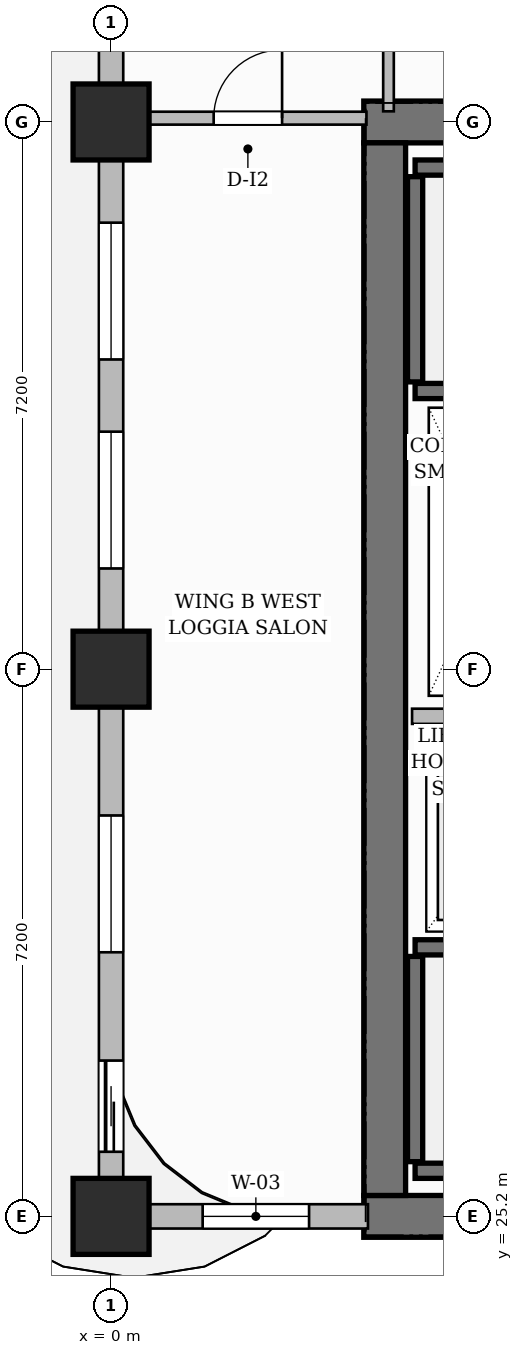
"""IFC4 building model, lengths in metres.
Left out: names, types, materials, properties, quantities, classifications, styles, units other than length and angle.
Written with IfcOpenShell. Run it as: python <this file> out.ifc"""

import sys

from ifc_helpers import new_model, si_unit, direction, frame, frame_2d, origin, origin_2d, place, context, subcontext, project, spatial, rectangle, extrude, source, transform, mapped, element, fill, save


model = new_model("IFC4")
c1 = context("Model", 3, precision=1e-05, world=origin(), true_north=direction((0.0, 1.0)))
c2 = subcontext(c1, "Body", "Model", "MODEL_VIEW")
j1 = project(units=[si_unit("LENGTHUNIT", "METRE"), si_unit("PLANEANGLEUNIT", "RADIAN")], contexts=[c1])
p1 = place(None, origin())
s1 = spatial("IfcSite", under=j1, at=p1, CompositionType="ELEMENT")
p2 = place(p1, origin())
s2 = spatial("IfcBuilding", under=s1, at=p2, CompositionType="ELEMENT")
p3 = place(p2, frame((0.0, 0.0, 122.9)))
s3 = spatial("IfcBuildingStorey", under=s2, at=p3, CompositionType="ELEMENT", Elevation=122.9)
for number, where, z_axis, x_axis in (
    (1, (3.325, 25.2, 0.0), (0.0, 0.0, 1.0), (1.0, 0.0, 0.0)),
    (2, (3.325, 39.6, 0.0), (0.0, 0.0, 1.0), (1.0, 0.0, 0.0)),
):
    element("IfcWall", number, at=place(p3, frame(where, z_axis=z_axis, x_axis=x_axis)), inside=s3, PredefinedType="SHEAR", context=c2, shape_type="SweptSolid", body=[
        extrude(rectangle(XDim=8.35, YDim=0.55, at=frame_2d((4.175, 0.0))), origin(), (0.0, 0.0, 1.0), 3.7),
    ])
p4 = place(p3, frame((3.6, 25.475, 0.0), z_axis=(0.0, 0.0, 1.0), x_axis=(0.0, 1.0, 0.0)))
e3 = element("IfcWall", 3, at=p4, inside=s3, PredefinedType="SHEAR", context=c2, shape_type="SweptSolid", body=[
    extrude(rectangle(XDim=13.85, YDim=0.55, at=frame_2d((6.925, 0.0))), origin(), (0.0, 0.0, 1.0), 3.7),
])
m1 = source(origin(), c2, "Body", "SweptSolid", [
    extrude(rectangle(XDim=1.0, YDim=1.0, at=origin_2d()), origin(), (0.0, 0.0, 1.0), 3.7),
])
for number, where, z_axis, x_axis in (
    (4, (0.0, 25.2, 0.0), (0.0, 0.0, 1.0), (1.0, 0.0, 0.0)),
    (5, (0.0, 32.4, 0.0), (0.0, 0.0, 1.0), (1.0, 0.0, 0.0)),
    (6, (0.0, 39.6, 0.0), (0.0, 0.0, 1.0), (1.0, 0.0, 0.0)),
):
    element("IfcColumn", number, at=place(p3, frame(where, z_axis=z_axis, x_axis=x_axis)), inside=s3, PredefinedType="COLUMN", context=c2, shape_type="MappedRepresentation", body=[
        mapped(m1, transform((0.0, 0.0, 0.0), scale=1.0)),
    ])
p5 = place(p3, frame((4.0, 25.8, 0.0), z_axis=(0.0, 0.0, 1.0), x_axis=(1.0, 0.0, 0.0)))
e7 = element("IfcWall", 7, at=p5, inside=s3, PredefinedType="SHEAR", context=c2, shape_type="SweptSolid", body=[
    extrude(rectangle(XDim=7.1, YDim=0.2, at=frame_2d((3.55, 0.0))), origin(), (0.0, 0.0, 1.0), 3.7),
])
p6 = place(p3, frame((4.0, 25.92, 0.0), z_axis=(0.0, 0.0, 1.0), x_axis=(0.0, 1.0, 0.0)))
e8 = element("IfcWall", 8, at=p6, inside=s3, PredefinedType="SHEAR", context=c2, shape_type="SweptSolid", body=[
    extrude(rectangle(XDim=2.7, YDim=0.2, at=frame_2d((1.35, 0.0))), origin(), (0.0, 0.0, 1.0), 3.7),
])
p7 = place(p3, frame((4.0, 28.74, 0.0), z_axis=(0.0, 0.0, 1.0), x_axis=(1.0, 0.0, 0.0)))
e9 = element("IfcWall", 9, at=p7, inside=s3, PredefinedType="SHEAR", context=c2, shape_type="SweptSolid", body=[
    extrude(rectangle(XDim=7.1, YDim=0.2, at=frame_2d((3.55, 0.0))), origin(), (0.0, 0.0, 1.0), 3.7),
])
p8 = place(p7, frame((5.815, 0.0, 0.0)))
e10 = element("IfcOpeningElement", 10, at=p8, cuts=e9, PredefinedType="OPENING", context=c2, shape_type="SweptSolid", body=[
    extrude(rectangle(XDim=1.05, YDim=2.2, at=frame_2d((0.525, 1.1))), frame((0.0, 0.11, 0.0), z_axis=(0.0, -1.0, 0.0), x_axis=(1.0, 0.0, 0.0)), (0.0, 0.0, 1.0), 0.22),
])
p9 = place(p3, frame((4.0, 39.0, 0.0), z_axis=(0.0, 0.0, 1.0), x_axis=(1.0, 0.0, 0.0)))
e11 = element("IfcWall", 11, at=p9, inside=s3, PredefinedType="SHEAR", context=c2, shape_type="SweptSolid", body=[
    extrude(rectangle(XDim=7.1, YDim=0.2, at=frame_2d((3.55, 0.0))), origin(), (0.0, 0.0, 1.0), 3.7),
])
p10 = place(p3, frame((4.0, 36.18, 0.0), z_axis=(0.0, 0.0, 1.0), x_axis=(0.0, 1.0, 0.0)))
e12 = element("IfcWall", 12, at=p10, inside=s3, PredefinedType="SHEAR", context=c2, shape_type="SweptSolid", body=[
    extrude(rectangle(XDim=2.7, YDim=0.2, at=frame_2d((1.35, 0.0))), origin(), (0.0, 0.0, 1.0), 3.7),
])
p11 = place(p3, frame((4.0, 36.06, 0.0), z_axis=(0.0, 0.0, 1.0), x_axis=(1.0, 0.0, 0.0)))
e13 = element("IfcWall", 13, at=p11, inside=s3, PredefinedType="SHEAR", context=c2, shape_type="SweptSolid", body=[
    extrude(rectangle(XDim=7.1, YDim=0.2, at=frame_2d((3.55, 0.0))), origin(), (0.0, 0.0, 1.0), 3.7),
])
p12 = place(p11, frame((5.815, 0.0, 0.0)))
e14 = element("IfcOpeningElement", 14, at=p12, cuts=e13, PredefinedType="OPENING", context=c2, shape_type="SweptSolid", body=[
    extrude(rectangle(XDim=1.05, YDim=2.2, at=frame_2d((0.525, 1.1))), frame((0.0, 0.11, 0.0), z_axis=(0.0, -1.0, 0.0), x_axis=(1.0, 0.0, 0.0)), (0.0, 0.0, 1.0), 0.22),
])
p13 = place(p3, frame((3.96, 31.78, 0.0), z_axis=(0.0, 0.0, 1.0), x_axis=(1.0, 0.0, 0.0)))
e15 = element("IfcWall", 15, at=p13, inside=s3, PredefinedType="PARTITIONING", context=c2, shape_type="SweptSolid", body=[
    extrude(rectangle(XDim=2.13, YDim=0.2, at=frame_2d((1.065, 0.0))), origin(), (0.0, 0.0, 1.0), 3.45),
])
p14 = place(p3, frame((0.24, 39.65, 0.0), z_axis=(0.0, 0.0, 1.0), x_axis=(1.0, 0.0, 0.0)))
e16 = element("IfcWall", 16, at=p14, inside=s3, PredefinedType="PARTITIONING", context=c2, shape_type="SweptSolid", body=[
    extrude(rectangle(XDim=3.12, YDim=0.17, at=frame_2d((1.56, 0.0))), origin(), (0.0, 0.0, 1.0), 3.45),
])
p15 = place(p14, frame((1.11, 0.0, 0.0)))
e17 = element("IfcOpeningElement", 17, at=p15, cuts=e16, PredefinedType="OPENING", context=c2, shape_type="SweptSolid", body=[
    extrude(rectangle(XDim=0.9, YDim=2.15, at=frame_2d((0.45, 1.075))), frame((0.0, 0.095, 0.0), z_axis=(0.0, -1.0, 0.0), x_axis=(1.0, 0.0, 0.0)), (0.0, 0.0, 1.0), 0.19),
])
p16 = place(p3, frame((3.65, 39.74, 0.0), z_axis=(0.0, 0.0, 1.0), x_axis=(0.0, 1.0, 0.0)))
e18 = element("IfcWall", 18, at=p16, inside=s3, PredefinedType="PARTITIONING", context=c2, shape_type="SweptSolid", body=[
    extrude(rectangle(XDim=1.745, YDim=0.14, at=frame_2d((0.873, 0.0))), origin(), (0.0, 0.0, 1.0), 3.45),
])
p17 = place(p3, frame((0.0, 25.2, 0.0), z_axis=(0.0, 0.0, 1.0), x_axis=(1.0, 0.0, 0.0)))
e19 = element("IfcWall", 19, at=p17, inside=s3, PredefinedType="SOLIDWALL", context=c2, shape_type="SweptSolid", body=[
    extrude(rectangle(XDim=3.38, YDim=0.32, at=frame_2d((1.69, 0.0))), origin(), (0.0, 0.0, 1.0), 3.45),
])
p18 = place(p17, frame((1.205, 0.0, 0.8)))
e20 = element("IfcOpeningElement", 20, at=p18, cuts=e19, PredefinedType="OPENING", context=c2, shape_type="SweptSolid", body=[
    extrude(rectangle(XDim=1.4, YDim=1.85, at=frame_2d((0.7, 0.925))), frame((0.0, 0.17, 0.0), z_axis=(0.0, -1.0, 0.0), x_axis=(1.0, 0.0, 0.0)), (0.0, 0.0, 1.0), 0.34),
])
p19 = place(p3, frame((0.0, 25.25, 0.0), z_axis=(0.0, 0.0, 1.0), x_axis=(0.0, 1.0, 0.0)))
e21 = element("IfcWall", 21, at=p19, inside=s3, PredefinedType="SOLIDWALL", context=c2, shape_type="SweptSolid", body=[
    extrude(rectangle(XDim=21.5, YDim=0.32, at=frame_2d((10.75, 0.0))), origin(), (0.0, 0.0, 1.0), 2.935),
])
p20 = place(p19, frame((18.607, 0.0, 0.0)))
e22 = element("IfcOpeningElement", 22, at=p20, cuts=e21, PredefinedType="OPENING", context=c2, shape_type="SweptSolid", body=[
    extrude(rectangle(XDim=1.2, YDim=2.2, at=frame_2d((0.6, 1.1))), frame((0.0, 0.17, 0.0), z_axis=(0.0, -1.0, 0.0), x_axis=(1.0, 0.0, 0.0)), (0.0, 0.0, 1.0), 0.34),
])
p21 = place(p19, frame((0.8, 0.0, 0.0)))
e23 = element("IfcOpeningElement", 23, at=p21, cuts=e21, PredefinedType="OPENING", context=c2, shape_type="SweptSolid", body=[
    extrude(rectangle(XDim=1.2, YDim=2.2, at=frame_2d((0.6, 1.1))), frame((0.0, 0.17, 0.0), z_axis=(0.0, -1.0, 0.0), x_axis=(1.0, 0.0, 0.0)), (0.0, 0.0, 1.0), 0.34),
])
p22 = place(p19, frame((3.425, 0.0, 0.8)))
e24 = element("IfcOpeningElement", 24, at=p22, cuts=e21, PredefinedType="OPENING", context=c2, shape_type="SweptSolid", body=[
    extrude(rectangle(XDim=1.8, YDim=1.85, at=frame_2d((0.9, 0.925))), frame((0.0, 0.17, 0.0), z_axis=(0.0, -1.0, 0.0), x_axis=(1.0, 0.0, 0.0)), (0.0, 0.0, 1.0), 0.34),
])
p23 = place(p19, frame((8.475, 0.0, 0.8)))
e25 = element("IfcOpeningElement", 25, at=p23, cuts=e21, PredefinedType="OPENING", context=c2, shape_type="SweptSolid", body=[
    extrude(rectangle(XDim=1.8, YDim=1.85, at=frame_2d((0.9, 0.925))), frame((0.0, 0.17, 0.0), z_axis=(0.0, -1.0, 0.0), x_axis=(1.0, 0.0, 0.0)), (0.0, 0.0, 1.0), 0.34),
])
p24 = place(p19, frame((11.225, 0.0, 0.8)))
e26 = element("IfcOpeningElement", 26, at=p24, cuts=e21, PredefinedType="OPENING", context=c2, shape_type="SweptSolid", body=[
    extrude(rectangle(XDim=1.8, YDim=1.85, at=frame_2d((0.9, 0.925))), frame((0.0, 0.17, 0.0), z_axis=(0.0, -1.0, 0.0), x_axis=(1.0, 0.0, 0.0)), (0.0, 0.0, 1.0), 0.34),
])
p25 = place(p19, frame((15.621, 0.0, 0.8)))
e27 = element("IfcOpeningElement", 27, at=p25, cuts=e21, PredefinedType="OPENING", context=c2, shape_type="SweptSolid", body=[
    extrude(rectangle(XDim=1.8, YDim=1.85, at=frame_2d((0.9, 0.925))), frame((0.0, 0.17, 0.0), z_axis=(0.0, -1.0, 0.0), x_axis=(1.0, 0.0, 0.0)), (0.0, 0.0, 1.0), 0.34),
])
m2 = source(origin(), c2, "Body", "SweptSolid", [
    extrude(rectangle(XDim=0.9, YDim=2.15, at=frame_2d((0.45, 1.075))), frame((0.0, 0.025, 0.0), z_axis=(0.0, -1.0, 0.0), x_axis=(1.0, 0.0, 0.0)), (0.0, 0.0, 1.0), 0.05),
])
p26 = place(p15, origin())
e28 = element("IfcDoor", 28, at=p26, inside=s3, OperationType="SINGLE_SWING_RIGHT", PredefinedType="DOOR", context=c2, shape_type="MappedRepresentation", body=[
    mapped(m2, transform((0.0, 0.0, 0.0), scale=1.0)),
])
fill(e17, e28)
m3 = source(origin(), c2, "Body", "SweptSolid", [
    extrude(rectangle(XDim=1.2, YDim=2.2, at=frame_2d((0.6, 1.1))), frame((0.0, 0.025, 0.0), z_axis=(0.0, -1.0, 0.0), x_axis=(1.0, 0.0, 0.0)), (0.0, 0.0, 1.0), 0.05),
])
p27 = place(p21, origin())
e29 = element("IfcDoor", 29, at=p27, inside=s3, OperationType="SLIDING_TO_LEFT", PredefinedType="DOOR", context=c2, shape_type="MappedRepresentation", body=[
    mapped(m3, transform((0.0, 0.0, 0.0), scale=1.0)),
])
fill(e23, e29)
m4 = source(origin(), c2, "Body", "SweptSolid", [
    extrude(rectangle(XDim=1.4, YDim=1.85, at=frame_2d((0.7, 0.925))), frame((0.0, 0.03, 0.0), z_axis=(0.0, -1.0, 0.0), x_axis=(1.0, 0.0, 0.0)), (0.0, 0.0, 1.0), 0.06),
])
p28 = place(p18, origin())
e30 = element("IfcWindow", 30, at=p28, inside=s3, PartitioningType="SINGLE_PANEL", PredefinedType="WINDOW", context=c2, shape_type="MappedRepresentation", body=[
    mapped(m4, transform((0.0, 0.0, 0.0), scale=1.0)),
])
fill(e20, e30)
m5 = source(origin(), c2, "Body", "SweptSolid", [
    extrude(rectangle(XDim=1.8, YDim=1.85, at=frame_2d((0.9, 0.925))), frame((0.0, 0.03, 0.0), z_axis=(0.0, -1.0, 0.0), x_axis=(1.0, 0.0, 0.0)), (0.0, 0.0, 1.0), 0.06),
])
p29 = place(p22, origin())
e31 = element("IfcWindow", 31, at=p29, inside=s3, PartitioningType="DOUBLE_PANEL_VERTICAL", PredefinedType="WINDOW", context=c2, shape_type="MappedRepresentation", body=[
    mapped(m5, transform((0.0, 0.0, 0.0), scale=1.0)),
])
fill(e24, e31)
p30 = place(p23, origin())
e32 = element("IfcWindow", 32, at=p30, inside=s3, PartitioningType="DOUBLE_PANEL_VERTICAL", PredefinedType="WINDOW", context=c2, shape_type="MappedRepresentation", body=[
    mapped(m5, transform((0.0, 0.0, 0.0), scale=1.0)),
])
fill(e25, e32)
p31 = place(p24, origin())
e33 = element("IfcWindow", 33, at=p31, inside=s3, PartitioningType="DOUBLE_PANEL_VERTICAL", PredefinedType="WINDOW", context=c2, shape_type="MappedRepresentation", body=[
    mapped(m5, transform((0.0, 0.0, 0.0), scale=1.0)),
])
fill(e26, e33)
save(model, sys.argv[1])
